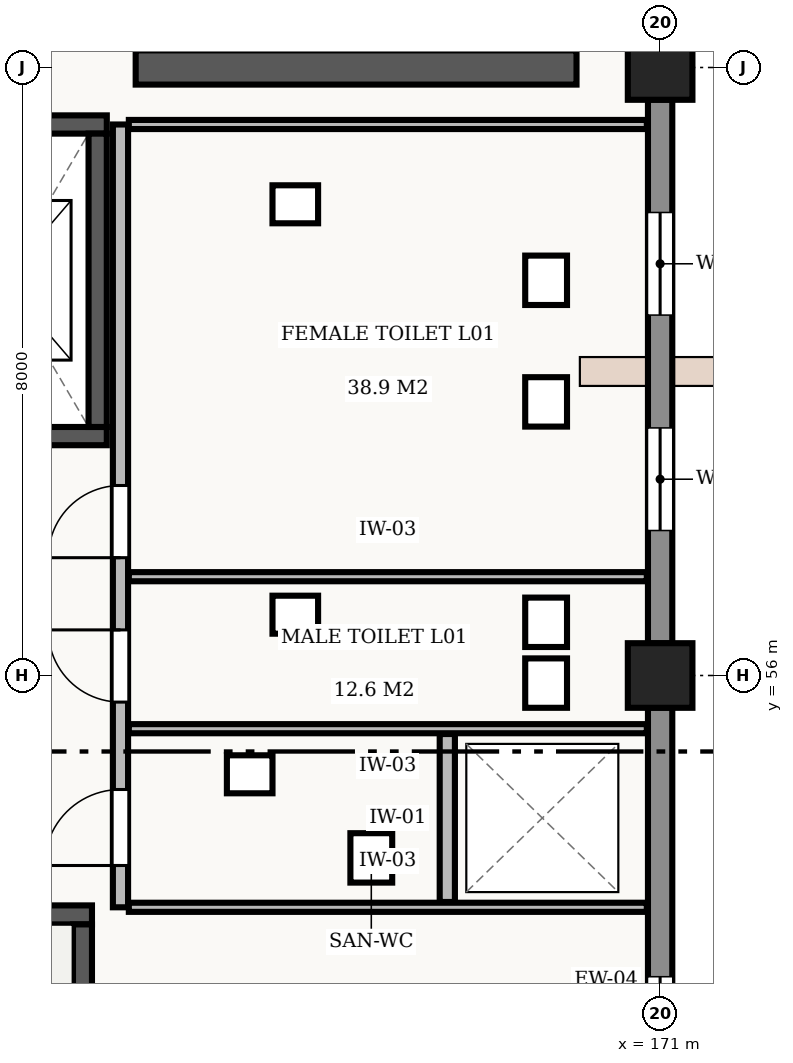
"""IFC4 building model, lengths in metres.
Left out: names, types, materials, properties, quantities, classifications, styles, units other than length and angle.
Written with IfcOpenShell. Run it as: python <this file> out.ifc"""

import sys

from ifc_helpers import new_model, si_unit, direction, frame, frame_2d, origin, origin_2d, place, context, subcontext, project, spatial, rectangle, extrude, element, fill, save


model = new_model("IFC4")
c1 = context("Model", 3, precision=1e-05, world=origin(), true_north=direction((0.0, 1.0)))
c2 = subcontext(c1, "Body", "Model", "MODEL_VIEW")
j1 = project(units=[si_unit("LENGTHUNIT", "METRE"), si_unit("PLANEANGLEUNIT", "RADIAN")], contexts=[c1])
p1 = place(None, origin())
s1 = spatial("IfcSite", under=j1, at=p1, CompositionType="ELEMENT")
p2 = place(p1, origin())
s2 = spatial("IfcBuilding", under=s1, at=p2, CompositionType="ELEMENT")
p3 = place(p2, frame((0.0, 0.0, 5.4)))
s3 = spatial("IfcBuildingStorey", under=s2, at=p3, CompositionType="ELEMENT", Elevation=5.4)
for number, where, z_axis, x_axis in (
    (1, (171.0, 56.0, 0.0), (0.0, 0.0, 1.0), (1.0, 0.0, 0.0)),
    (2, (171.0, 64.0, 0.0), (0.0, 0.0, 1.0), (1.0, 0.0, 0.0)),
):
    element("IfcColumn", number, at=place(p3, frame(where, z_axis=z_axis, x_axis=x_axis)), inside=s3, PredefinedType="COLUMN", context=c2, shape_type="SweptSolid", body=[
        extrude(rectangle(XDim=0.85, YDim=0.85, at=origin_2d()), origin(), (0.0, 0.0, 1.0), 4.8),
    ])
p4 = place(p3, frame((171.0, 63.577, 0.0), z_axis=(0.0, 0.0, 1.0), x_axis=(0.0, -1.0, 0.0)))
e3 = element("IfcWall", 3, at=p4, inside=s3, PredefinedType="STANDARD", context=c2, shape_type="SweptSolid", body=[
    extrude(rectangle(XDim=7.154, YDim=0.32, at=frame_2d((3.577, 0.0))), origin(), (0.0, 0.0, 1.0), 3.86),
])
p5 = place(p4, frame((1.485, 0.0, 0.9)))
e4 = element("IfcOpeningElement", 4, at=p5, cuts=e3, PredefinedType="OPENING", context=c2, shape_type="SweptSolid", body=[
    extrude(rectangle(XDim=1.35, YDim=2.0, at=frame_2d((0.675, 1.0))), frame((0.0, 0.172, 0.0), z_axis=(0.0, -1.0, 0.0), x_axis=(1.0, 0.0, 0.0)), (0.0, 0.0, 1.0), 0.344),
])
p6 = place(p4, frame((4.319, 0.0, 0.9)))
e5 = element("IfcOpeningElement", 5, at=p6, cuts=e3, PredefinedType="OPENING", context=c2, shape_type="SweptSolid", body=[
    extrude(rectangle(XDim=1.35, YDim=2.0, at=frame_2d((0.675, 1.0))), frame((0.0, 0.172, 0.0), z_axis=(0.0, -1.0, 0.0), x_axis=(1.0, 0.0, 0.0)), (0.0, 0.0, 1.0), 0.344),
])
p7 = place(p3, frame((171.0, 55.577, 0.0), z_axis=(0.0, 0.0, 1.0), x_axis=(0.0, -1.0, 0.0)))
e6 = element("IfcWall", 6, at=p7, inside=s3, PredefinedType="STANDARD", context=c2, shape_type="SweptSolid", body=[
    extrude(rectangle(XDim=7.154, YDim=0.32, at=frame_2d((3.577, 0.0))), origin(), (0.0, 0.0, 1.0), 3.86),
])
p8 = place(p7, frame((3.541, 0.0, 0.9)))
e7 = element("IfcOpeningElement", 7, at=p8, cuts=e6, PredefinedType="OPENING", context=c2, shape_type="SweptSolid", body=[
    extrude(rectangle(XDim=2.4, YDim=1.35, at=frame_2d((1.2, 0.675))), frame((0.0, 0.172, 0.0), z_axis=(0.0, -1.0, 0.0), x_axis=(1.0, 0.0, 0.0)), (0.0, 0.0, 1.0), 0.344),
])
p9 = place(p3, frame((163.525, 52.85, 0.0), z_axis=(0.0, 0.0, 1.0), x_axis=(-1.0, 0.0, 0.0)))
e8 = element("IfcWall", 8, at=p9, inside=s3, PredefinedType="SHEAR", context=c2, shape_type="SweptSolid", body=[
    extrude(rectangle(XDim=9.65, YDim=0.25, at=frame_2d((4.825, 0.0))), origin(), (0.0, 0.0, 1.0), 4.48),
])
p10 = place(p9, frame((7.925, 0.0, 0.0)))
e9 = element("IfcOpeningElement", 9, at=p10, cuts=e8, PredefinedType="OPENING", context=c2, shape_type="SweptSolid", body=[
    extrude(rectangle(XDim=1.25, YDim=2.15, at=frame_2d((0.625, 1.075))), frame((0.0, 0.137, 0.0), z_axis=(0.0, -1.0, 0.0), x_axis=(1.0, 0.0, 0.0)), (0.0, 0.0, 1.0), 0.274),
])
p11 = place(p3, frame((163.4, 48.875, 0.0), z_axis=(0.0, 0.0, 1.0), x_axis=(0.0, 1.0, 0.0)))
e10 = element("IfcWall", 10, at=p11, inside=s3, PredefinedType="SHEAR", context=c2, shape_type="SweptSolid", body=[
    extrude(rectangle(XDim=3.85, YDim=0.25, at=frame_2d((1.925, 0.0))), origin(), (0.0, 0.0, 1.0), 4.48),
])
p12 = place(p3, frame((160.975, 59.15, 0.0), z_axis=(0.0, 0.0, 1.0), x_axis=(1.0, 0.0, 0.0)))
e11 = element("IfcWall", 11, at=p12, inside=s3, PredefinedType="SHEAR", context=c2, shape_type="SweptSolid", body=[
    extrude(rectangle(XDim=2.745, YDim=0.24, at=frame_2d((1.373, 0.0))), origin(), (0.0, 0.0, 1.0), 4.48),
])
p13 = place(p12, frame((0.825, 0.0, 0.0)))
e12 = element("IfcOpeningElement", 12, at=p13, cuts=e11, PredefinedType="OPENING", context=c2, shape_type="SweptSolid", body=[
    extrude(rectangle(XDim=1.1, YDim=2.2, at=frame_2d((0.55, 1.1))), frame((0.0, 0.132, 0.0), z_axis=(0.0, -1.0, 0.0), x_axis=(1.0, 0.0, 0.0)), (0.0, 0.0, 1.0), 0.264),
])
p14 = place(p3, frame((163.72, 63.25, 0.0), z_axis=(0.0, 0.0, 1.0), x_axis=(-1.0, 0.0, 0.0)))
e13 = element("IfcWall", 13, at=p14, inside=s3, PredefinedType="SHEAR", context=c2, shape_type="SweptSolid", body=[
    extrude(rectangle(XDim=2.745, YDim=0.24, at=frame_2d((1.373, 0.0))), origin(), (0.0, 0.0, 1.0), 4.48),
])
p15 = place(p3, frame((163.6, 59.27, 0.0), z_axis=(0.0, 0.0, 1.0), x_axis=(0.0, 1.0, 0.0)))
e14 = element("IfcWall", 14, at=p15, inside=s3, PredefinedType="SHEAR", context=c2, shape_type="SweptSolid", body=[
    extrude(rectangle(XDim=3.86, YDim=0.24, at=frame_2d((1.93, 0.0))), origin(), (0.0, 0.0, 1.0), 4.48),
])
p16 = place(p3, frame((164.1, 64.0, 0.0), z_axis=(0.0, 0.0, 1.0), x_axis=(1.0, 0.0, 0.0)))
e15 = element("IfcWall", 15, at=p16, inside=s3, PredefinedType="SHEAR", context=c2, shape_type="SweptSolid", body=[
    extrude(rectangle(XDim=5.8, YDim=0.45, at=frame_2d((2.9, 0.0))), origin(), (0.0, 0.0, 1.0), 3.53),
])
p17 = place(p3, frame((163.9, 52.95, 0.0), z_axis=(0.0, 0.0, 1.0), x_axis=(0.0, 1.0, 0.0)))
e16 = element("IfcWall", 16, at=p17, inside=s3, PredefinedType="STANDARD", context=c2, shape_type="SweptSolid", body=[
    extrude(rectangle(XDim=10.3, YDim=0.2, at=frame_2d((5.15, 0.0))), origin(), (0.0, 0.0, 1.0), 4.48),
])
p18 = place(p17, frame((0.55, 0.0, 0.0)))
e17 = element("IfcOpeningElement", 17, at=p18, cuts=e16, PredefinedType="OPENING", context=c2, shape_type="SweptSolid", body=[
    extrude(rectangle(XDim=1.0, YDim=2.1, at=frame_2d((0.5, 1.05))), frame((0.0, 0.112, 0.0), z_axis=(0.0, -1.0, 0.0), x_axis=(1.0, 0.0, 0.0)), (0.0, 0.0, 1.0), 0.224),
])
p19 = place(p17, frame((2.7, 0.0, 0.0)))
e18 = element("IfcOpeningElement", 18, at=p19, cuts=e16, PredefinedType="OPENING", context=c2, shape_type="SweptSolid", body=[
    extrude(rectangle(XDim=0.95, YDim=2.1, at=frame_2d((0.475, 1.05))), frame((0.0, 0.112, 0.0), z_axis=(0.0, -1.0, 0.0), x_axis=(1.0, 0.0, 0.0)), (0.0, 0.0, 1.0), 0.224),
])
p20 = place(p17, frame((4.6, 0.0, 0.0)))
e19 = element("IfcOpeningElement", 19, at=p20, cuts=e16, PredefinedType="OPENING", context=c2, shape_type="SweptSolid", body=[
    extrude(rectangle(XDim=0.95, YDim=2.1, at=frame_2d((0.475, 1.05))), frame((0.0, 0.112, 0.0), z_axis=(0.0, -1.0, 0.0), x_axis=(1.0, 0.0, 0.0)), (0.0, 0.0, 1.0), 0.224),
])
p21 = place(p3, frame((168.2, 53.02, 0.0), z_axis=(0.0, 0.0, 1.0), x_axis=(0.0, 1.0, 0.0)))
e20 = element("IfcWall", 20, at=p21, inside=s3, PredefinedType="STANDARD", context=c2, shape_type="SweptSolid", body=[
    extrude(rectangle(XDim=2.21, YDim=0.2, at=frame_2d((1.105, 0.0))), origin(), (0.0, 0.0, 1.0), 4.48),
])
for number, where, z_axis, x_axis in (
    (21, (164.01, 52.95, 0.0), (0.0, 0.0, 1.0), (1.0, 0.0, 0.0)),
    (22, (164.01, 55.3, 0.0), (0.0, 0.0, 1.0), (1.0, 0.0, 0.0)),
    (23, (164.01, 57.3, 0.0), (0.0, 0.0, 1.0), (1.0, 0.0, 0.0)),
    (24, (164.01, 63.25, 0.0), (0.0, 0.0, 1.0), (1.0, 0.0, 0.0)),
):
    element("IfcWall", number, at=place(p3, frame(where, z_axis=z_axis, x_axis=x_axis)), inside=s3, PredefinedType="STANDARD", context=c2, shape_type="SweptSolid", body=[
        extrude(rectangle(XDim=6.815, YDim=0.12, at=frame_2d((3.407, 0.0))), origin(), (0.0, 0.0, 1.0), 4.48),
    ])
p22 = place(p5, origin())
e25 = element("IfcWindow", 25, at=p22, inside=s3, PartitioningType="SINGLE_PANEL", PredefinedType="WINDOW", context=c2, shape_type="SweptSolid", body=[
    extrude(rectangle(XDim=1.35, YDim=2.0, at=frame_2d((0.675, 1.0))), frame((0.0, 0.03, 0.0), z_axis=(0.0, -1.0, 0.0), x_axis=(1.0, 0.0, 0.0)), (0.0, 0.0, 1.0), 0.06),
])
fill(e4, e25)
p23 = place(p6, origin())
e26 = element("IfcWindow", 26, at=p23, inside=s3, PartitioningType="SINGLE_PANEL", PredefinedType="WINDOW", context=c2, shape_type="SweptSolid", body=[
    extrude(rectangle(XDim=1.35, YDim=2.0, at=frame_2d((0.675, 1.0))), frame((0.0, 0.03, 0.0), z_axis=(0.0, -1.0, 0.0), x_axis=(1.0, 0.0, 0.0)), (0.0, 0.0, 1.0), 0.06),
])
fill(e5, e26)
p24 = place(p8, origin())
e27 = element("IfcWindow", 27, at=p24, inside=s3, PartitioningType="SINGLE_PANEL", PredefinedType="WINDOW", context=c2, shape_type="SweptSolid", body=[
    extrude(rectangle(XDim=2.4, YDim=1.35, at=frame_2d((1.2, 0.675))), frame((0.0, 0.03, 0.0), z_axis=(0.0, -1.0, 0.0), x_axis=(1.0, 0.0, 0.0)), (0.0, 0.0, 1.0), 0.06),
])
fill(e7, e27)
p25 = place(p18, origin())
e28 = element("IfcDoor", 28, at=p25, inside=s3, OperationType="SINGLE_SWING_LEFT", PredefinedType="DOOR", context=c2, shape_type="SweptSolid", body=[
    extrude(rectangle(XDim=1.0, YDim=2.1, at=frame_2d((0.5, 1.05))), frame((0.0, 0.025, 0.0), z_axis=(0.0, -1.0, 0.0), x_axis=(1.0, 0.0, 0.0)), (0.0, 0.0, 1.0), 0.05),
])
fill(e17, e28)
p26 = place(p19, origin())
e29 = element("IfcDoor", 29, at=p26, inside=s3, OperationType="SINGLE_SWING_RIGHT", PredefinedType="DOOR", context=c2, shape_type="SweptSolid", body=[
    extrude(rectangle(XDim=0.95, YDim=2.1, at=frame_2d((0.475, 1.05))), frame((0.0, 0.025, 0.0), z_axis=(0.0, -1.0, 0.0), x_axis=(1.0, 0.0, 0.0)), (0.0, 0.0, 1.0), 0.05),
])
fill(e18, e29)
p27 = place(p20, origin())
e30 = element("IfcDoor", 30, at=p27, inside=s3, OperationType="SINGLE_SWING_LEFT", PredefinedType="DOOR", context=c2, shape_type="SweptSolid", body=[
    extrude(rectangle(XDim=0.95, YDim=2.1, at=frame_2d((0.475, 1.05))), frame((0.0, 0.025, 0.0), z_axis=(0.0, -1.0, 0.0), x_axis=(1.0, 0.0, 0.0)), (0.0, 0.0, 1.0), 0.05),
])
fill(e19, e30)
save(model, sys.argv[1])
